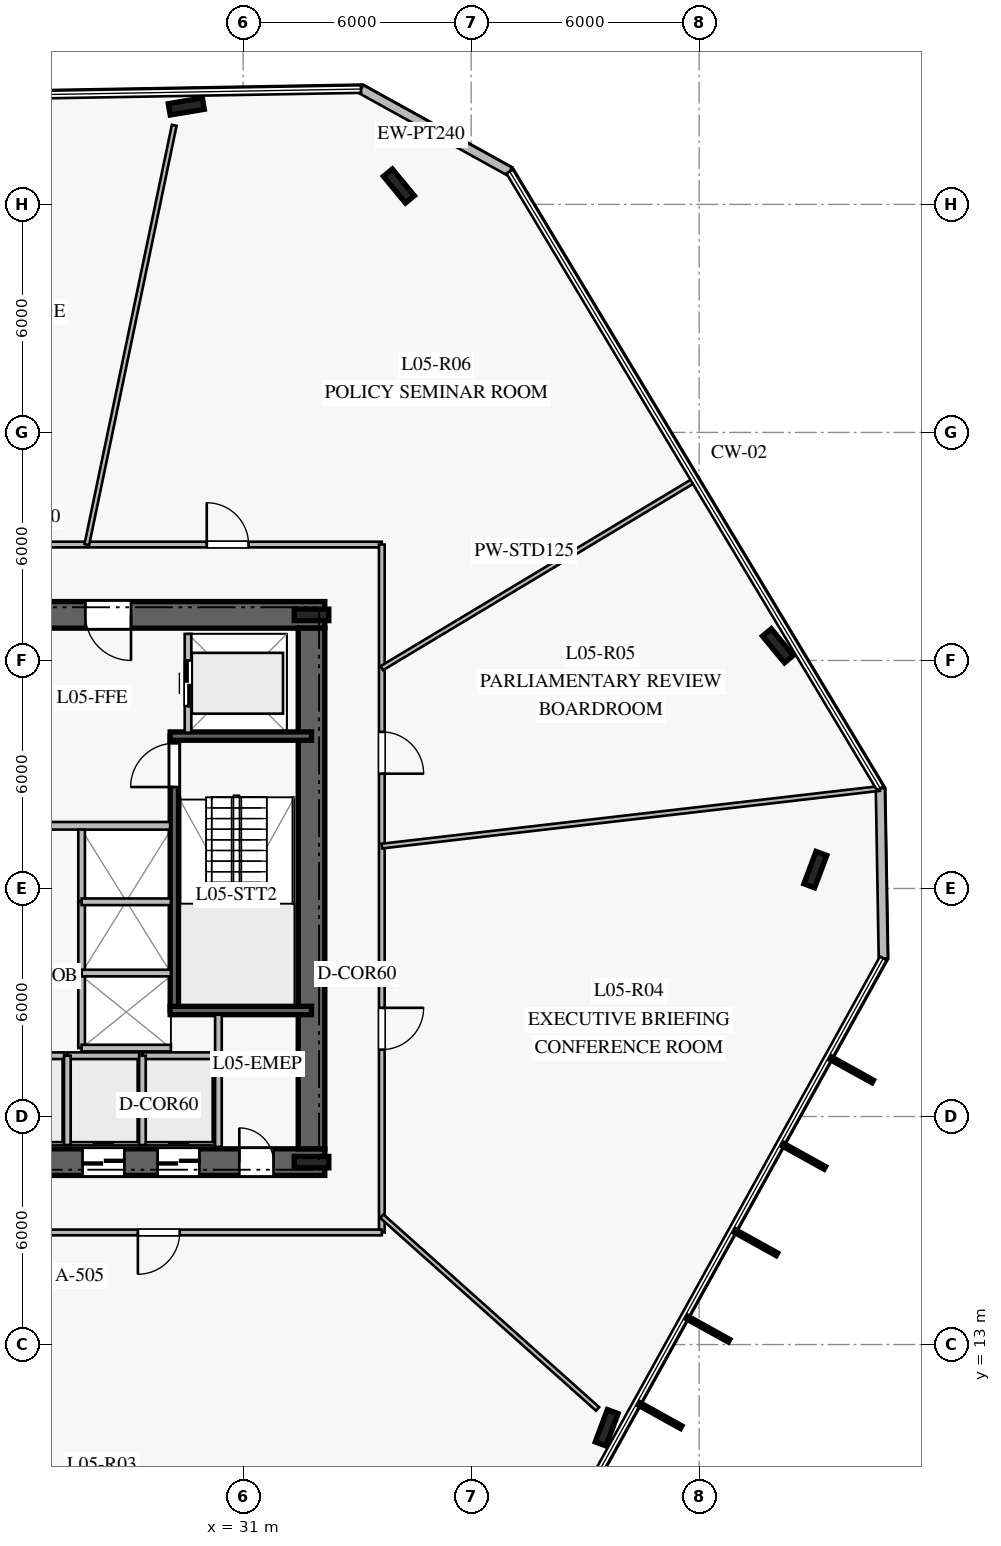
"""IFC4 building model, lengths in metres.
Left out: names, types, materials, properties, quantities, classifications, styles, units other than length and angle.
Written with IfcOpenShell. Run it as: python <this file> out.ifc"""

import sys

from ifc_helpers import new_model, si_unit, direction, frame, frame_2d, origin, origin_2d, place, context, subcontext, project, spatial, rectangle, i_section, extrude, element, fill, save


model = new_model("IFC4")
c1 = context("Model", 3, precision=1e-05, world=origin(), true_north=direction((0.0, 1.0)))
c2 = subcontext(c1, "Body", "Model", "MODEL_VIEW")
j1 = project(units=[si_unit("LENGTHUNIT", "METRE"), si_unit("PLANEANGLEUNIT", "RADIAN")], contexts=[c1])
p1 = place(None, origin())
s1 = spatial("IfcSite", under=j1, at=p1, CompositionType="ELEMENT")
p2 = place(p1, origin())
s2 = spatial("IfcBuilding", under=s1, at=p2, CompositionType="ELEMENT")
p3 = place(p2, frame((0.0, 0.0, 24.0)))
s3 = spatial("IfcBuildingStorey", under=s2, at=p3, CompositionType="ELEMENT", Elevation=24.0)
p4 = place(p3, frame((16.85, 17.8, 0.0), z_axis=(0.0, 0.0, 1.0), x_axis=(1.0, 0.0, 0.0)))
e1 = element("IfcWall", 1, at=p4, inside=s3, PredefinedType="SHEAR", context=c2, shape_type="SweptSolid", body=[
    extrude(rectangle(XDim=16.3, YDim=0.7, at=frame_2d((8.15, 0.0))), origin(), (0.0, 0.0, 1.0), 3.76),
])
p5 = place(p4, frame((5.1, 0.0, 0.0)))
e2 = element("IfcOpeningElement", 2, at=p5, cuts=e1, PredefinedType="OPENING", context=c2, shape_type="SweptSolid", body=[
    extrude(rectangle(XDim=1.2, YDim=2.25, at=frame_2d((0.6, 1.125))), frame((0.0, 0.36, 0.0), z_axis=(0.0, -1.0, 0.0), x_axis=(1.0, 0.0, 0.0)), (0.0, 0.0, 1.0), 0.72),
])
p6 = place(p4, frame((14.05, 0.0, 0.0)))
e3 = element("IfcOpeningElement", 3, at=p6, cuts=e1, PredefinedType="OPENING", context=c2, shape_type="SweptSolid", body=[
    extrude(rectangle(XDim=0.9, YDim=2.1, at=frame_2d((0.45, 1.05))), frame((0.0, 0.36, 0.0), z_axis=(0.0, -1.0, 0.0), x_axis=(1.0, 0.0, 0.0)), (0.0, 0.0, 1.0), 0.72),
])
p7 = place(p4, frame((7.95, 0.0, 0.0)))
e4 = element("IfcOpeningElement", 4, at=p7, cuts=e1, PredefinedType="OPENING", context=c2, shape_type="SweptSolid", body=[
    extrude(rectangle(XDim=1.1, YDim=2.2, at=frame_2d((0.55, 1.1))), frame((0.0, 0.36, 0.0), z_axis=(0.0, -1.0, 0.0), x_axis=(1.0, 0.0, 0.0)), (0.0, 0.0, 1.0), 0.72),
])
p8 = place(p4, frame((9.925, 0.0, 0.0)))
e5 = element("IfcOpeningElement", 5, at=p8, cuts=e1, PredefinedType="OPENING", context=c2, shape_type="SweptSolid", body=[
    extrude(rectangle(XDim=1.1, YDim=2.2, at=frame_2d((0.55, 1.1))), frame((0.0, 0.36, 0.0), z_axis=(0.0, -1.0, 0.0), x_axis=(1.0, 0.0, 0.0)), (0.0, 0.0, 1.0), 0.72),
])
p9 = place(p4, frame((11.9, 0.0, 0.0)))
e6 = element("IfcOpeningElement", 6, at=p9, cuts=e1, PredefinedType="OPENING", context=c2, shape_type="SweptSolid", body=[
    extrude(rectangle(XDim=1.1, YDim=2.2, at=frame_2d((0.55, 1.1))), frame((0.0, 0.36, 0.0), z_axis=(0.0, -1.0, 0.0), x_axis=(1.0, 0.0, 0.0)), (0.0, 0.0, 1.0), 0.72),
])
p10 = place(p3, frame((33.15, 32.2, 0.0), z_axis=(0.0, 0.0, 1.0), x_axis=(-1.0, 0.0, 0.0)))
e7 = element("IfcWall", 7, at=p10, inside=s3, PredefinedType="SHEAR", context=c2, shape_type="SweptSolid", body=[
    extrude(rectangle(XDim=16.3, YDim=0.7, at=frame_2d((8.15, 0.0))), origin(), (0.0, 0.0, 1.0), 3.76),
])
p11 = place(p10, frame((5.1, 0.0, 0.0)))
e8 = element("IfcOpeningElement", 8, at=p11, cuts=e7, PredefinedType="OPENING", context=c2, shape_type="SweptSolid", body=[
    extrude(rectangle(XDim=1.2, YDim=2.25, at=frame_2d((0.6, 1.125))), frame((0.0, 0.36, 0.0), z_axis=(0.0, -1.0, 0.0), x_axis=(1.0, 0.0, 0.0)), (0.0, 0.0, 1.0), 0.72),
])
p12 = place(p3, frame((32.8, 18.15, 0.0), z_axis=(0.0, 0.0, 1.0), x_axis=(0.0, 1.0, 0.0)))
e9 = element("IfcWall", 9, at=p12, inside=s3, PredefinedType="SHEAR", context=c2, shape_type="SweptSolid", body=[
    extrude(rectangle(XDim=13.7, YDim=0.7, at=frame_2d((6.85, 0.0))), origin(), (0.0, 0.0, 1.0), 3.76),
])
for number, where, z_axis, x_axis in (
    (10, (32.8, 17.8, 0.0), (0.0, 0.0, 1.0), (1.0, 0.0, 0.0)),
    (11, (32.8, 32.2, 0.0), (0.0, 0.0, 1.0), (1.0, 0.0, 0.0)),
):
    element("IfcColumn", number, at=place(p3, frame(where, z_axis=z_axis, x_axis=x_axis)), inside=s3, PredefinedType="COLUMN", context=c2, shape_type="SweptSolid", body=[
        extrude(i_section(OverallWidth=0.302, OverallDepth=0.91, WebThickness=0.021, FlangeThickness=0.04, at=origin_2d()), origin(), (0.0, 0.0, 1.0), 4.0),
    ])
p13 = place(p3, frame((29.19, 21.79, 0.0), z_axis=(0.0, 0.0, 1.0), x_axis=(0.0, 1.0, 0.0)))
e12 = element("IfcWall", 12, at=p13, inside=s3, PredefinedType="SOLIDWALL", context=c2, shape_type="SweptSolid", body=[
    extrude(rectangle(XDim=7.22, YDim=0.22, at=frame_2d((3.61, 0.0))), origin(), (0.0, 0.0, 1.0), 3.76),
])
p14 = place(p13, frame((5.88, 0.0, 0.0)))
e13 = element("IfcOpeningElement", 13, at=p14, cuts=e12, PredefinedType="OPENING", context=c2, shape_type="SweptSolid", body=[
    extrude(rectangle(XDim=1.15, YDim=2.2, at=frame_2d((0.575, 1.1))), frame((0.0, 0.12, 0.0), z_axis=(0.0, -1.0, 0.0), x_axis=(1.0, 0.0, 0.0)), (0.0, 0.0, 1.0), 0.24),
])
for number, where, z_axis, x_axis in (
    (14, (29.08, 21.79, 0.0), (0.0, 0.0, 1.0), (1.0, 0.0, 0.0)),
    (15, (29.08, 29.01, 0.0), (0.0, 0.0, 1.0), (1.0, 0.0, 0.0)),
):
    element("IfcWall", number, at=place(p3, frame(where, z_axis=z_axis, x_axis=x_axis)), inside=s3, PredefinedType="SOLIDWALL", context=c2, shape_type="SweptSolid", body=[
        extrude(rectangle(XDim=3.72, YDim=0.22, at=frame_2d((1.86, 0.0))), origin(), (0.0, 0.0, 1.0), 3.76),
    ])
for number, where, z_axis, x_axis in (
    (16, (45.072, 31.386, -0.24), (0.0, 0.0, 1.0), (-0.636, 0.772, 0.0)),
    (17, (35.099, 43.484, -0.24), (0.0, 0.0, 1.0), (-0.636, 0.772, 0.0)),
    (18, (29.505, 45.576, -0.24), (0.0, 0.0, 1.0), (0.986, 0.165, 0.0)),
    (19, (40.567, 10.811, -0.24), (0.0, 0.0, 1.0), (0.35, 0.937, 0.0)),
    (20, (46.057, 25.496, -0.24), (0.0, 0.0, 1.0), (0.35, 0.937, 0.0)),
):
    element("IfcColumn", number, at=place(p3, frame(where, z_axis=z_axis, x_axis=x_axis)), inside=s3, PredefinedType="COLUMN", context=c2, shape_type="SweptSolid", body=[
        extrude(i_section(OverallWidth=0.302, OverallDepth=0.91, WebThickness=0.021, FlangeThickness=0.04, at=origin_2d()), origin(), (0.0, 0.0, 1.0), 4.24),
    ])
p15 = place(p3, frame((38.015, 43.866, 0.0), z_axis=(0.0, 0.0, 1.0), x_axis=(-0.874617651583, 0.48481332855, 0.0)))
e21 = element("IfcWall", 21, at=p15, inside=s3, PredefinedType="STANDARD", context=c2, shape_type="SweptSolid", body=[
    extrude(rectangle(XDim=4.474, YDim=0.24, at=frame_2d((2.237, 0.0))), origin(), (0.0, 0.0, 1.0), 3.76),
])
p16 = place(p3, frame((47.845, 23.162, 0.0), z_axis=(0.0, 0.0, 1.0), x_axis=(-0.017194596879, 0.999852161991, 0.0)))
e22 = element("IfcWall", 22, at=p16, inside=s3, PredefinedType="STANDARD", context=c2, shape_type="SweptSolid", body=[
    extrude(rectangle(XDim=4.473, YDim=0.24, at=frame_2d((2.236, 0.0))), origin(), (0.0, 0.0, 1.0), 3.76),
])
p17 = place(p3, frame((25.7, 26.65, 0.0), z_axis=(0.0, 0.0, 1.0), x_axis=(1.0, 0.0, 0.0)))
e23 = element("IfcWall", 23, at=p17, inside=s3, PredefinedType="PARTITIONING", context=c2, shape_type="SweptSolid", body=[
    extrude(rectangle(XDim=3.38, YDim=0.2, at=frame_2d((1.69, 0.0))), origin(), (0.0, 0.0, 1.0), 3.76),
])
p18 = place(p3, frame((30.35, 18.2, 0.0), z_axis=(0.0, 0.0, 1.0), x_axis=(0.0, 1.0, 0.0)))
e24 = element("IfcWall", 24, at=p18, inside=s3, PredefinedType="PARTITIONING", context=c2, shape_type="SweptSolid", body=[
    extrude(rectangle(XDim=3.48, YDim=0.175, at=frame_2d((1.74, 0.0))), origin(), (0.0, 0.0, 1.0), 3.76),
])
p19 = place(p3, frame((24.4, 20.6, 0.0), z_axis=(0.0, 0.0, 1.0), x_axis=(1.0, 0.0, 0.0)))
e25 = element("IfcWall", 25, at=p19, inside=s3, PredefinedType="PARTITIONING", context=c2, shape_type="SweptSolid", body=[
    extrude(rectangle(XDim=1.9, YDim=0.175, at=frame_2d((0.95, 0.0))), origin(), (0.0, 0.0, 1.0), 3.76),
])
p20 = place(p3, frame((26.375, 20.6, 0.0), z_axis=(0.0, 0.0, 1.0), x_axis=(1.0, 0.0, 0.0)))
e26 = element("IfcWall", 26, at=p20, inside=s3, PredefinedType="PARTITIONING", context=c2, shape_type="SweptSolid", body=[
    extrude(rectangle(XDim=1.9, YDim=0.175, at=frame_2d((0.95, 0.0))), origin(), (0.0, 0.0, 1.0), 3.76),
])
p21 = place(p3, frame((26.375, 18.25, 0.0), z_axis=(0.0, 0.0, 1.0), x_axis=(0.0, 1.0, 0.0)))
e27 = element("IfcWall", 27, at=p21, inside=s3, PredefinedType="PARTITIONING", context=c2, shape_type="SweptSolid", body=[
    extrude(rectangle(XDim=2.35, YDim=0.175, at=frame_2d((1.175, 0.0))), origin(), (0.0, 0.0, 1.0), 3.76),
])
p22 = place(p3, frame((28.35, 20.6, 0.0), z_axis=(0.0, 0.0, 1.0), x_axis=(1.0, 0.0, 0.0)))
e28 = element("IfcWall", 28, at=p22, inside=s3, PredefinedType="PARTITIONING", context=c2, shape_type="SweptSolid", body=[
    extrude(rectangle(XDim=1.9, YDim=0.175, at=frame_2d((0.95, 0.0))), origin(), (0.0, 0.0, 1.0), 3.76),
])
p23 = place(p3, frame((28.35, 18.25, 0.0), z_axis=(0.0, 0.0, 1.0), x_axis=(0.0, 1.0, 0.0)))
e29 = element("IfcWall", 29, at=p23, inside=s3, PredefinedType="PARTITIONING", context=c2, shape_type="SweptSolid", body=[
    extrude(rectangle(XDim=2.35, YDim=0.175, at=frame_2d((1.175, 0.0))), origin(), (0.0, 0.0, 1.0), 3.76),
])
p24 = place(p3, frame((26.75, 20.8, 0.0), z_axis=(0.0, 0.0, 1.0), x_axis=(0.0, 1.0, 0.0)))
e30 = element("IfcWall", 30, at=p24, inside=s3, PredefinedType="PARTITIONING", context=c2, shape_type="SweptSolid", body=[
    extrude(rectangle(XDim=1.9, YDim=0.175, at=frame_2d((0.95, 0.0))), origin(), (0.0, 0.0, 1.0), 3.76),
])
p25 = place(p3, frame((26.75, 20.8, 0.0), z_axis=(0.0, 0.0, 1.0), x_axis=(1.0, 0.0, 0.0)))
e31 = element("IfcWall", 31, at=p25, inside=s3, PredefinedType="PARTITIONING", context=c2, shape_type="SweptSolid", body=[
    extrude(rectangle(XDim=2.35, YDim=0.175, at=frame_2d((1.175, 0.0))), origin(), (0.0, 0.0, 1.0), 3.76),
])
p26 = place(p3, frame((26.75, 22.775, 0.0), z_axis=(0.0, 0.0, 1.0), x_axis=(0.0, 1.0, 0.0)))
e32 = element("IfcWall", 32, at=p26, inside=s3, PredefinedType="PARTITIONING", context=c2, shape_type="SweptSolid", body=[
    extrude(rectangle(XDim=1.9, YDim=0.175, at=frame_2d((0.95, 0.0))), origin(), (0.0, 0.0, 1.0), 3.76),
])
p27 = place(p3, frame((26.75, 22.775, 0.0), z_axis=(0.0, 0.0, 1.0), x_axis=(1.0, 0.0, 0.0)))
e33 = element("IfcWall", 33, at=p27, inside=s3, PredefinedType="PARTITIONING", context=c2, shape_type="SweptSolid", body=[
    extrude(rectangle(XDim=2.35, YDim=0.175, at=frame_2d((1.175, 0.0))), origin(), (0.0, 0.0, 1.0), 3.76),
])
p28 = place(p3, frame((26.75, 24.65, 0.0), z_axis=(0.0, 0.0, 1.0), x_axis=(0.0, 1.0, 0.0)))
e34 = element("IfcWall", 34, at=p28, inside=s3, PredefinedType="PARTITIONING", context=c2, shape_type="SweptSolid", body=[
    extrude(rectangle(XDim=1.9, YDim=0.175, at=frame_2d((0.95, 0.0))), origin(), (0.0, 0.0, 1.0), 3.76),
])
p29 = place(p3, frame((26.75, 24.65, 0.0), z_axis=(0.0, 0.0, 1.0), x_axis=(1.0, 0.0, 0.0)))
e35 = element("IfcWall", 35, at=p29, inside=s3, PredefinedType="PARTITIONING", context=c2, shape_type="SweptSolid", body=[
    extrude(rectangle(XDim=2.35, YDim=0.175, at=frame_2d((1.175, 0.0))), origin(), (0.0, 0.0, 1.0), 3.76),
])
p30 = place(p3, frame((29.55, 29.1, 0.0), z_axis=(0.0, 0.0, 1.0), x_axis=(0.0, 1.0, 0.0)))
e36 = element("IfcWall", 36, at=p30, inside=s3, PredefinedType="PARTITIONING", context=c2, shape_type="SweptSolid", body=[
    extrude(rectangle(XDim=2.6, YDim=0.175, at=frame_2d((1.3, 0.0))), origin(), (0.0, 0.0, 1.0), 3.76),
])
p31 = place(p30, frame((0.7, 0.0, 0.0)))
e37 = element("IfcOpeningElement", 37, at=p31, cuts=e36, PredefinedType="OPENING", context=c2, shape_type="SweptSolid", body=[
    extrude(rectangle(XDim=1.2, YDim=2.2, at=frame_2d((0.6, 1.1))), frame((0.0, 0.098, 0.0), z_axis=(0.0, -1.0, 0.0), x_axis=(1.0, 0.0, 0.0)), (0.0, 0.0, 1.0), 0.195),
])
p32 = place(p3, frame((15.35, 34.05, 0.0), z_axis=(0.0, 0.0, 1.0), x_axis=(1.0, 0.0, 0.0)))
e38 = element("IfcWall", 38, at=p32, inside=s3, PredefinedType="PARTITIONING", context=c2, shape_type="SweptSolid", body=[
    extrude(rectangle(XDim=19.3, YDim=0.15, at=frame_2d((9.65, 0.0))), origin(), (0.0, 0.0, 1.0), 3.21),
])
p33 = place(p32, frame((14.693, 0.0, 0.0)))
e39 = element("IfcOpeningElement", 39, at=p33, cuts=e38, PredefinedType="OPENING", context=c2, shape_type="SweptSolid", body=[
    extrude(rectangle(XDim=1.1, YDim=2.2, at=frame_2d((0.55, 1.1))), frame((0.0, 0.085, 0.0), z_axis=(0.0, -1.0, 0.0), x_axis=(1.0, 0.0, 0.0)), (0.0, 0.0, 1.0), 0.17),
])
p34 = place(p32, frame((5.319, 0.0, 0.0)))
e40 = element("IfcOpeningElement", 40, at=p34, cuts=e38, PredefinedType="OPENING", context=c2, shape_type="SweptSolid", body=[
    extrude(rectangle(XDim=1.1, YDim=2.2, at=frame_2d((0.55, 1.1))), frame((0.0, 0.085, 0.0), z_axis=(0.0, -1.0, 0.0), x_axis=(1.0, 0.0, 0.0)), (0.0, 0.0, 1.0), 0.17),
])
p35 = place(p3, frame((34.65, 34.05, 0.0), z_axis=(0.0, 0.0, 1.0), x_axis=(0.0, -1.0, 0.0)))
e41 = element("IfcWall", 41, at=p35, inside=s3, PredefinedType="PARTITIONING", context=c2, shape_type="SweptSolid", body=[
    extrude(rectangle(XDim=18.1, YDim=0.15, at=frame_2d((9.05, 0.0))), origin(), (0.0, 0.0, 1.0), 3.21),
])
p36 = place(p35, frame((12.19, 0.0, 0.0)))
e42 = element("IfcOpeningElement", 42, at=p36, cuts=e41, PredefinedType="OPENING", context=c2, shape_type="SweptSolid", body=[
    extrude(rectangle(XDim=1.1, YDim=2.2, at=frame_2d((0.55, 1.1))), frame((0.0, 0.085, 0.0), z_axis=(0.0, -1.0, 0.0), x_axis=(1.0, 0.0, 0.0)), (0.0, 0.0, 1.0), 0.17),
])
p37 = place(p35, frame((4.929, 0.0, 0.0)))
e43 = element("IfcOpeningElement", 43, at=p37, cuts=e41, PredefinedType="OPENING", context=c2, shape_type="SweptSolid", body=[
    extrude(rectangle(XDim=1.1, YDim=2.2, at=frame_2d((0.55, 1.1))), frame((0.0, 0.085, 0.0), z_axis=(0.0, -1.0, 0.0), x_axis=(1.0, 0.0, 0.0)), (0.0, 0.0, 1.0), 0.17),
])
p38 = place(p3, frame((34.65, 15.95, 0.0), z_axis=(0.0, 0.0, 1.0), x_axis=(-1.0, 0.0, 0.0)))
e44 = element("IfcWall", 44, at=p38, inside=s3, PredefinedType="PARTITIONING", context=c2, shape_type="SweptSolid", body=[
    extrude(rectangle(XDim=19.3, YDim=0.15, at=frame_2d((9.65, 0.0))), origin(), (0.0, 0.0, 1.0), 3.21),
])
p39 = place(p38, frame((14.693, 0.0, 0.0)))
e45 = element("IfcOpeningElement", 45, at=p39, cuts=e44, PredefinedType="OPENING", context=c2, shape_type="SweptSolid", body=[
    extrude(rectangle(XDim=1.1, YDim=2.2, at=frame_2d((0.55, 1.1))), frame((0.0, 0.085, 0.0), z_axis=(0.0, -1.0, 0.0), x_axis=(1.0, 0.0, 0.0)), (0.0, 0.0, 1.0), 0.17),
])
p40 = place(p38, frame((5.319, 0.0, 0.0)))
e46 = element("IfcOpeningElement", 46, at=p40, cuts=e44, PredefinedType="OPENING", context=c2, shape_type="SweptSolid", body=[
    extrude(rectangle(XDim=1.1, YDim=2.2, at=frame_2d((0.55, 1.1))), frame((0.0, 0.085, 0.0), z_axis=(0.0, -1.0, 0.0), x_axis=(1.0, 0.0, 0.0)), (0.0, 0.0, 1.0), 0.17),
])
p41 = place(p3, frame((34.65, 30.798, 0.0), z_axis=(0.0, 0.0, 1.0), x_axis=(0.85716053623, 0.515049332715, 0.0)))
e47 = element("IfcWall", 47, at=p41, inside=s3, PredefinedType="PARTITIONING", context=c2, shape_type="SweptSolid", body=[
    extrude(rectangle(XDim=9.597, YDim=0.125, at=frame_2d((4.798, 0.0))), origin(), (0.0, 0.0, 1.0), 3.02),
])
p42 = place(p3, frame((26.887, 34.05, 0.0), z_axis=(0.0, 0.0, 1.0), x_axis=(0.204117775604, 0.97894633851, 0.0)))
e48 = element("IfcWall", 48, at=p42, inside=s3, PredefinedType="PARTITIONING", context=c2, shape_type="SweptSolid", body=[
    extrude(rectangle(XDim=11.268, YDim=0.125, at=frame_2d((5.634, 0.0))), origin(), (0.0, 0.0, 1.0), 3.76),
])
p43 = place(p3, frame((34.65, 16.378, 0.0), z_axis=(0.0, 0.0, 1.0), x_axis=(0.745724240471, -0.666254723941, 0.0)))
e49 = element("IfcWall", 49, at=p43, inside=s3, PredefinedType="PARTITIONING", context=c2, shape_type="SweptSolid", body=[
    extrude(rectangle(XDim=7.613, YDim=0.125, at=frame_2d((3.806, 0.0))), origin(), (0.0, 0.0, 1.0), 3.05),
])
p44 = place(p3, frame((34.65, 26.116, 0.0), z_axis=(0.0, 0.0, 1.0), x_axis=(0.993368494043, 0.114974062475, 0.0)))
e50 = element("IfcWall", 50, at=p44, inside=s3, PredefinedType="PARTITIONING", context=c2, shape_type="SweptSolid", body=[
    extrude(rectangle(XDim=13.187, YDim=0.125, at=frame_2d((6.593, 0.0))), origin(), (0.0, 0.0, 1.0), 3.05),
])
p45 = place(p14, origin())
e51 = element("IfcDoor", 51, at=p45, inside=s3, OperationType="SINGLE_SWING_LEFT", PredefinedType="DOOR", context=c2, shape_type="SweptSolid", body=[
    extrude(rectangle(XDim=1.15, YDim=2.2, at=frame_2d((0.575, 1.1))), frame((0.0, 0.025, 0.0), z_axis=(0.0, -1.0, 0.0), x_axis=(1.0, 0.0, 0.0)), (0.0, 0.0, 1.0), 0.05),
])
fill(e13, e51)
p46 = place(p11, origin())
e52 = element("IfcDoor", 52, at=p46, inside=s3, OperationType="SINGLE_SWING_LEFT", PredefinedType="DOOR", context=c2, shape_type="SweptSolid", body=[
    extrude(rectangle(XDim=1.2, YDim=2.25, at=frame_2d((0.6, 1.125))), frame((0.0, 0.025, 0.0), z_axis=(0.0, -1.0, 0.0), x_axis=(1.0, 0.0, 0.0)), (0.0, 0.0, 1.0), 0.05),
])
fill(e8, e52)
p47 = place(p6, origin())
e53 = element("IfcDoor", 53, at=p47, inside=s3, OperationType="SINGLE_SWING_LEFT", PredefinedType="DOOR", context=c2, shape_type="SweptSolid", body=[
    extrude(rectangle(XDim=0.9, YDim=2.1, at=frame_2d((0.45, 1.05))), frame((0.0, 0.025, 0.0), z_axis=(0.0, -1.0, 0.0), x_axis=(1.0, 0.0, 0.0)), (0.0, 0.0, 1.0), 0.05),
])
fill(e3, e53)
p48 = place(p8, origin())
e54 = element("IfcDoor", 54, at=p48, inside=s3, OperationType="DOUBLE_DOOR_SLIDING", PredefinedType="DOOR", context=c2, shape_type="SweptSolid", body=[
    extrude(rectangle(XDim=1.1, YDim=2.2, at=frame_2d((0.55, 1.1))), frame((0.0, 0.025, 0.0), z_axis=(0.0, -1.0, 0.0), x_axis=(1.0, 0.0, 0.0)), (0.0, 0.0, 1.0), 0.05),
])
fill(e5, e54)
p49 = place(p9, origin())
e55 = element("IfcDoor", 55, at=p49, inside=s3, OperationType="DOUBLE_DOOR_SLIDING", PredefinedType="DOOR", context=c2, shape_type="SweptSolid", body=[
    extrude(rectangle(XDim=1.1, YDim=2.2, at=frame_2d((0.55, 1.1))), frame((0.0, 0.025, 0.0), z_axis=(0.0, -1.0, 0.0), x_axis=(1.0, 0.0, 0.0)), (0.0, 0.0, 1.0), 0.05),
])
fill(e6, e55)
p50 = place(p31, origin())
e56 = element("IfcDoor", 56, at=p50, inside=s3, OperationType="DOUBLE_DOOR_SLIDING", PredefinedType="DOOR", context=c2, shape_type="SweptSolid", body=[
    extrude(rectangle(XDim=1.2, YDim=2.2, at=frame_2d((0.6, 1.1))), frame((0.0, 0.025, 0.0), z_axis=(0.0, -1.0, 0.0), x_axis=(1.0, 0.0, 0.0)), (0.0, 0.0, 1.0), 0.05),
])
fill(e37, e56)
p51 = place(p40, origin())
e57 = element("IfcDoor", 57, at=p51, inside=s3, OperationType="SINGLE_SWING_RIGHT", PredefinedType="DOOR", context=c2, shape_type="SweptSolid", body=[
    extrude(rectangle(XDim=1.1, YDim=2.2, at=frame_2d((0.55, 1.1))), frame((0.0, 0.025, 0.0), z_axis=(0.0, -1.0, 0.0), x_axis=(1.0, 0.0, 0.0)), (0.0, 0.0, 1.0), 0.05),
])
fill(e46, e57)
p52 = place(p36, origin())
e58 = element("IfcDoor", 58, at=p52, inside=s3, OperationType="SINGLE_SWING_LEFT", PredefinedType="DOOR", context=c2, shape_type="SweptSolid", body=[
    extrude(rectangle(XDim=1.1, YDim=2.2, at=frame_2d((0.55, 1.1))), frame((0.0, 0.025, 0.0), z_axis=(0.0, -1.0, 0.0), x_axis=(1.0, 0.0, 0.0)), (0.0, 0.0, 1.0), 0.05),
])
fill(e42, e58)
p53 = place(p37, origin())
e59 = element("IfcDoor", 59, at=p53, inside=s3, OperationType="SINGLE_SWING_RIGHT", PredefinedType="DOOR", context=c2, shape_type="SweptSolid", body=[
    extrude(rectangle(XDim=1.1, YDim=2.2, at=frame_2d((0.55, 1.1))), frame((0.0, 0.025, 0.0), z_axis=(0.0, -1.0, 0.0), x_axis=(1.0, 0.0, 0.0)), (0.0, 0.0, 1.0), 0.05),
])
fill(e43, e59)
p54 = place(p33, origin())
e60 = element("IfcDoor", 60, at=p54, inside=s3, OperationType="SINGLE_SWING_LEFT", PredefinedType="DOOR", context=c2, shape_type="SweptSolid", body=[
    extrude(rectangle(XDim=1.1, YDim=2.2, at=frame_2d((0.55, 1.1))), frame((0.0, 0.025, 0.0), z_axis=(0.0, -1.0, 0.0), x_axis=(1.0, 0.0, 0.0)), (0.0, 0.0, 1.0), 0.05),
])
fill(e39, e60)
save(model, sys.argv[1])
